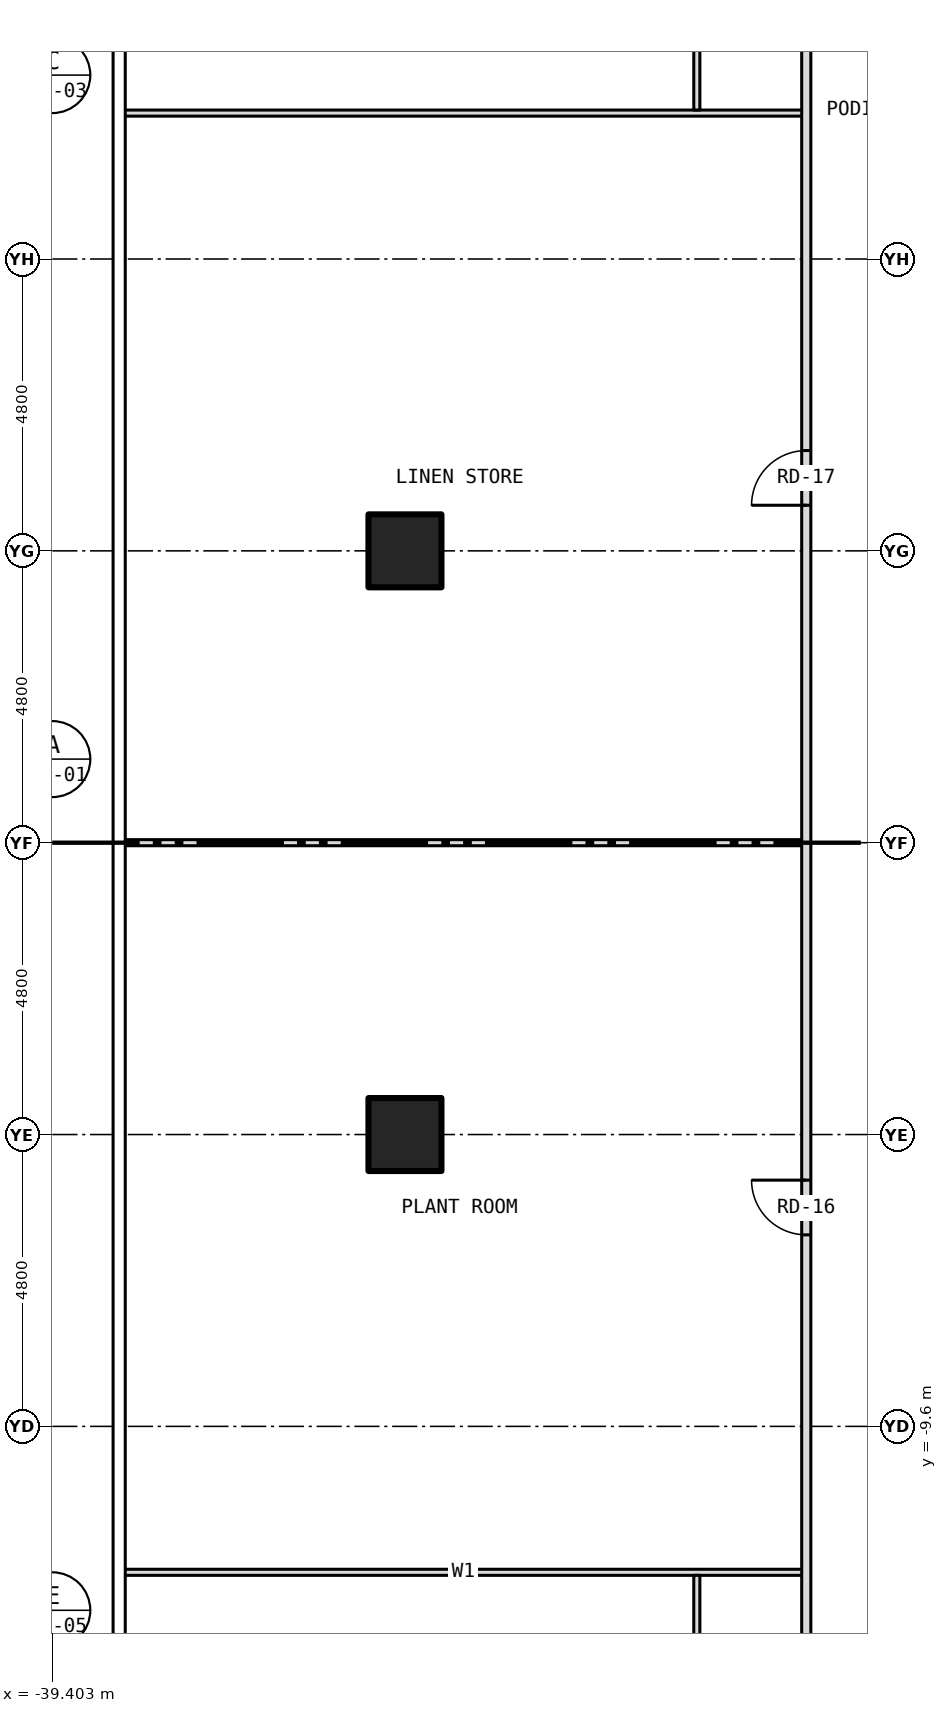
"""IFC4 building model, lengths in metres.
Left out: names, types, materials, properties, quantities, classifications, styles, units other than length and angle.
Written with IfcOpenShell. Run it as: python <this file> out.ifc"""

import sys

from ifc_helpers import new_model, si_unit, direction, frame, frame_2d, origin, origin_2d, place, context, subcontext, project, spatial, rectangle, hollow_rectangle, extrude, element, fill, save


model = new_model("IFC4")
c1 = context("Model", 3, precision=1e-05, world=origin(), true_north=direction((0.0, 1.0)))
c2 = subcontext(c1, "Body", "Model", "MODEL_VIEW")
j1 = project(units=[si_unit("LENGTHUNIT", "METRE"), si_unit("PLANEANGLEUNIT", "RADIAN")], contexts=[c1])
p1 = place(None, origin())
s1 = spatial("IfcSite", under=j1, at=p1, CompositionType="ELEMENT")
p2 = place(p1, origin())
s2 = spatial("IfcBuilding", under=s1, at=p2, CompositionType="ELEMENT")
p3 = place(p2, frame((0.0, 0.0, 29.0)))
s3 = spatial("IfcBuildingStorey", under=s2, at=p3, CompositionType="ELEMENT", Elevation=29.0)
for number, where, z_axis, x_axis in (
    (1, (-33.6, -4.8, -0.2), (0.0, 0.0, 1.0), (1.0, 0.0, 0.0)),
    (2, (-33.6, 4.8, -0.2), (0.0, 0.0, 1.0), (1.0, 0.0, 0.0)),
):
    element("IfcColumn", number, at=place(p3, frame(where, z_axis=z_axis, x_axis=x_axis)), inside=s3, PredefinedType="COLUMN", context=c2, shape_type="SweptSolid", body=[
        extrude(hollow_rectangle(XDim=1.2, YDim=1.2, WallThickness=0.07, at=origin_2d()), origin(), (0.0, 0.0, 1.0), 4.4),
    ])
for number, where, z_axis, x_axis in (
    (3, (-38.28, -12.0, 0.0), (0.0, 0.0, 1.0), (1.0, 0.0, 0.0)),
    (4, (-38.28, 0.0, 0.0), (0.0, 0.0, 1.0), (1.0, 0.0, 0.0)),
    (5, (-38.28, 12.0, 0.0), (0.0, 0.0, 1.0), (1.0, 0.0, 0.0)),
):
    element("IfcWall", number, at=place(p3, frame(where, z_axis=z_axis, x_axis=x_axis)), inside=s3, PredefinedType="PARTITIONING", context=c2, shape_type="SweptSolid", body=[
        extrude(rectangle(XDim=11.28, YDim=0.1, at=frame_2d((5.64, 0.0))), origin(), (0.0, 0.0, 1.0), 4.2),
    ])
for number, where, z_axis, x_axis in (
    (6, (-28.8, -14.246, 0.0), (0.0, 0.0, 1.0), (0.0, 1.0, 0.0)),
    (7, (-28.8, 12.05, 0.0), (0.0, 0.0, 1.0), (0.0, 1.0, 0.0)),
):
    element("IfcWall", number, at=place(p3, frame(where, z_axis=z_axis, x_axis=x_axis)), inside=s3, PredefinedType="PARTITIONING", context=c2, shape_type="SweptSolid", body=[
        extrude(rectangle(XDim=2.196, YDim=0.1, at=frame_2d((1.098, 0.0))), origin(), (0.0, 0.0, 1.0), 3.583),
    ])
p4 = place(p3, frame((-27.0, -13.725, 0.0), z_axis=(0.0, 0.0, 1.0), x_axis=(0.0, 1.0, 0.0)))
e8 = element("IfcWall", 8, at=p4, inside=s3, PredefinedType="PARTITIONING", context=c2, shape_type="SweptSolid", body=[
    extrude(rectangle(XDim=27.45, YDim=0.15, at=frame_2d((13.725, 0.0))), origin(), (0.0, 0.0, 1.0), 4.2),
])
p5 = place(p4, frame((7.275, 0.0, 0.0)))
e9 = element("IfcOpeningElement", 9, at=p5, cuts=e8, PredefinedType="OPENING", context=c2, shape_type="SweptSolid", body=[
    extrude(rectangle(XDim=0.9, YDim=2.1, at=frame_2d((0.45, 1.05))), frame((0.0, 0.087, 0.0), z_axis=(0.0, -1.0, 0.0), x_axis=(1.0, 0.0, 0.0)), (0.0, 0.0, 1.0), 0.174),
])
p6 = place(p4, frame((19.275, 0.0, 0.0)))
e10 = element("IfcOpeningElement", 10, at=p6, cuts=e8, PredefinedType="OPENING", context=c2, shape_type="SweptSolid", body=[
    extrude(rectangle(XDim=0.9, YDim=2.1, at=frame_2d((0.45, 1.05))), frame((0.0, 0.087, 0.0), z_axis=(0.0, -1.0, 0.0), x_axis=(1.0, 0.0, 0.0)), (0.0, 0.0, 1.0), 0.174),
])
p7 = place(p5, origin())
e11 = element("IfcDoor", 11, at=p7, inside=s3, OperationType="SINGLE_SWING_RIGHT", PredefinedType="DOOR", context=c2, shape_type="SweptSolid", body=[
    extrude(rectangle(XDim=0.9, YDim=2.1, at=frame_2d((0.45, 1.05))), frame((0.0, 0.025, 0.0), z_axis=(0.0, -1.0, 0.0), x_axis=(1.0, 0.0, 0.0)), (0.0, 0.0, 1.0), 0.05),
])
fill(e9, e11)
p8 = place(p6, origin())
e12 = element("IfcDoor", 12, at=p8, inside=s3, OperationType="SINGLE_SWING_LEFT", PredefinedType="DOOR", context=c2, shape_type="SweptSolid", body=[
    extrude(rectangle(XDim=0.9, YDim=2.1, at=frame_2d((0.45, 1.05))), frame((0.0, 0.025, 0.0), z_axis=(0.0, -1.0, 0.0), x_axis=(1.0, 0.0, 0.0)), (0.0, 0.0, 1.0), 0.05),
])
fill(e10, e12)
save(model, sys.argv[1])
